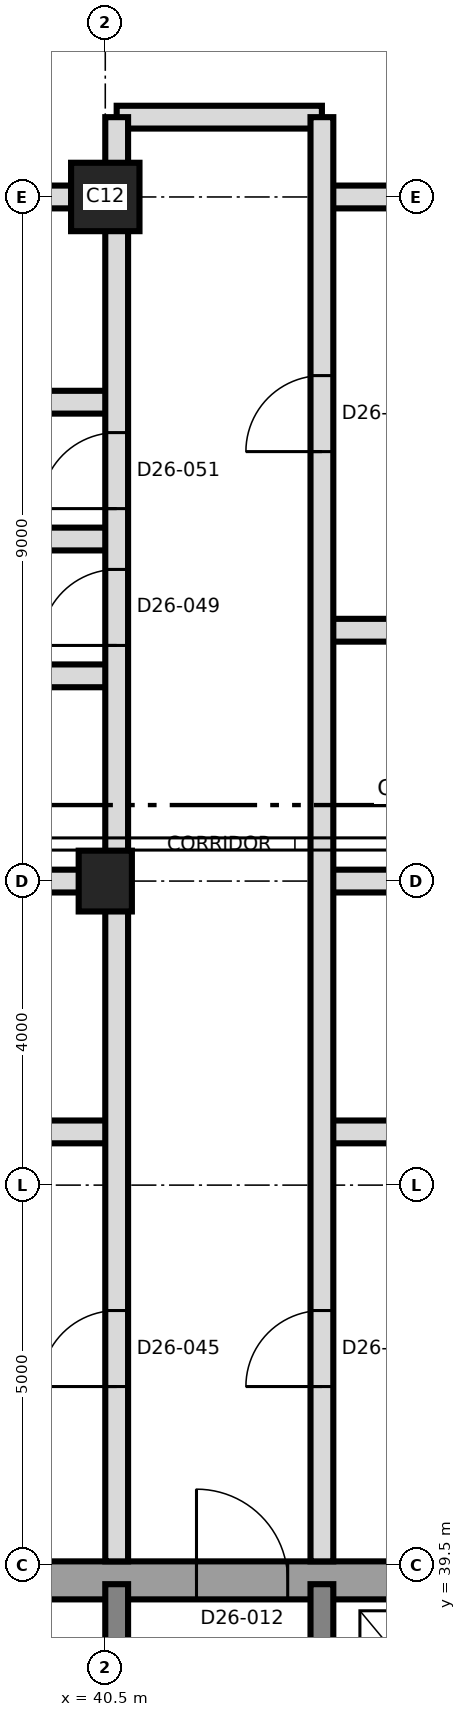
"""IFC4 building model, lengths in metres.
Left out: names, types, materials, properties, quantities, classifications, styles, units other than length and angle.
Written with IfcOpenShell. Run it as: python <this file> out.ifc"""

import sys

from ifc_helpers import new_model, si_unit, direction, frame, frame_2d, origin, origin_2d, place, context, subcontext, project, spatial, rectangle, extrude, element, fill, save


model = new_model("IFC4")
c1 = context("Model", 3, precision=1e-05, world=origin(), true_north=direction((0.0, 1.0)))
c2 = subcontext(c1, "Body", "Model", "MODEL_VIEW")
j1 = project(units=[si_unit("LENGTHUNIT", "METRE"), si_unit("PLANEANGLEUNIT", "RADIAN")], contexts=[c1])
p1 = place(None, origin())
s1 = spatial("IfcSite", under=j1, at=p1, CompositionType="ELEMENT")
p2 = place(p1, origin())
s2 = spatial("IfcBuilding", under=s1, at=p2, CompositionType="ELEMENT")
p3 = place(p2, frame((0.0, 0.0, 232.8)))
s3 = spatial("IfcBuildingStorey", under=s2, at=p3, CompositionType="ELEMENT", Elevation=232.8)
p4 = place(p3, frame((31.25, 39.3, 0.0), z_axis=(0.0, 0.0, 1.0), x_axis=(1.0, 0.0, 0.0)))
e1 = element("IfcWall", 1, at=p4, inside=s3, PredefinedType="SHEAR", context=c2, shape_type="SweptSolid", body=[
    extrude(rectangle(XDim=27.0, YDim=0.5, at=frame_2d((13.5, 0.0))), origin(), (0.0, 0.0, 1.0), 3.7),
])
p5 = place(p4, frame((10.45, 0.0, 0.0)))
e2 = element("IfcOpeningElement", 2, at=p5, cuts=e1, PredefinedType="OPENING", context=c2, shape_type="SweptSolid", body=[
    extrude(rectangle(XDim=1.2, YDim=2.1, at=frame_2d((0.6, 1.05))), frame((0.0, 0.26, 0.0), z_axis=(0.0, -1.0, 0.0), x_axis=(1.0, 0.0, 0.0)), (0.0, 0.0, 1.0), 0.52),
])
for number, where, z_axis, x_axis in (
    (3, (40.65, 33.5, 0.0), (0.0, 0.0, 1.0), (0.0, 1.0, 0.0)),
    (4, (43.35, 33.5, 0.0), (0.0, 0.0, 1.0), (0.0, 1.0, 0.0)),
):
    element("IfcWall", number, at=place(p3, frame(where, z_axis=z_axis, x_axis=x_axis)), inside=s3, PredefinedType="SHEAR", context=c2, shape_type="SweptSolid", body=[
        extrude(rectangle(XDim=5.75, YDim=0.3, at=frame_2d((2.875, 0.0))), origin(), (0.0, 0.0, 1.0), 3.7),
    ])
p6 = place(p3, frame((40.5, 48.5, 0.0), z_axis=(0.0, 0.0, 1.0), x_axis=(0.0, 1.0, 0.0)))
e5 = element("IfcColumn", 5, at=p6, inside=s3, PredefinedType="COLUMN", context=c2, shape_type="SweptSolid", body=[
    extrude(rectangle(XDim=0.8, YDim=0.7, at=origin_2d()), origin(), (0.0, 0.0, 1.0), 3.7),
])
p7 = place(p3, frame((40.5, 57.5, 0.0), z_axis=(0.0, 0.0, 1.0), x_axis=(1.0, 0.0, 0.0)))
e6 = element("IfcColumn", 6, at=p7, inside=s3, PredefinedType="COLUMN", context=c2, shape_type="SweptSolid", body=[
    extrude(rectangle(XDim=0.9, YDim=0.9, at=origin_2d()), origin(), (0.0, 0.0, 1.0), 3.7),
])
for number, where, z_axis, x_axis in (
    (7, (37.15, 45.2, 0.0), (0.0, 0.0, 1.0), (1.0, 0.0, 0.0)),
    (8, (43.35, 45.2, 0.0), (0.0, 0.0, 1.0), (1.0, 0.0, 0.0)),
):
    element("IfcWall", number, at=place(p3, frame(where, z_axis=z_axis, x_axis=x_axis)), inside=s3, PredefinedType="PARTITIONING", context=c2, shape_type="SweptSolid", body=[
        extrude(rectangle(XDim=3.5, YDim=0.3, at=frame_2d((1.75, 0.0))), origin(), (0.0, 0.0, 1.0), 3.4),
    ])
p8 = place(p3, frame((29.275, 48.5, 0.0), z_axis=(0.0, 0.0, 1.0), x_axis=(1.0, 0.0, 0.0)))
e9 = element("IfcWall", 9, at=p8, inside=s3, PredefinedType="PARTITIONING", context=c2, shape_type="SweptSolid", body=[
    extrude(rectangle(XDim=11.375, YDim=0.3, at=frame_2d((5.688, 0.0))), origin(), (0.0, 0.0, 1.0), 3.4),
])
p9 = place(p3, frame((43.35, 48.5, 0.0), z_axis=(0.0, 0.0, 1.0), x_axis=(1.0, 0.0, 0.0)))
e10 = element("IfcWall", 10, at=p9, inside=s3, PredefinedType="PARTITIONING", context=c2, shape_type="SweptSolid", body=[
    extrude(rectangle(XDim=8.555, YDim=0.3, at=frame_2d((4.277, 0.0))), origin(), (0.0, 0.0, 1.0), 3.4),
])
p10 = place(p3, frame((37.45, 51.2, 0.0), z_axis=(0.0, 0.0, 1.0), x_axis=(1.0, 0.0, 0.0)))
e11 = element("IfcWall", 11, at=p10, inside=s3, PredefinedType="PARTITIONING", context=c2, shape_type="SweptSolid", body=[
    extrude(rectangle(XDim=3.2, YDim=0.3, at=frame_2d((1.6, 0.0))), origin(), (0.0, 0.0, 1.0), 3.4),
])
p11 = place(p3, frame((43.35, 51.8, 0.0), z_axis=(0.0, 0.0, 1.0), x_axis=(1.0, 0.0, 0.0)))
e12 = element("IfcWall", 12, at=p11, inside=s3, PredefinedType="PARTITIONING", context=c2, shape_type="SweptSolid", body=[
    extrude(rectangle(XDim=3.5, YDim=0.3, at=frame_2d((1.75, 0.0))), origin(), (0.0, 0.0, 1.0), 3.4),
])
p12 = place(p3, frame((29.812, 53.0, 0.0), z_axis=(0.0, 0.0, 1.0), x_axis=(1.0, 0.0, 0.0)))
e13 = element("IfcWall", 13, at=p12, inside=s3, PredefinedType="PARTITIONING", context=c2, shape_type="SweptSolid", body=[
    extrude(rectangle(XDim=10.838, YDim=0.3, at=frame_2d((5.419, 0.0))), origin(), (0.0, 0.0, 1.0), 3.4),
])
p13 = place(p3, frame((37.45, 54.8, 0.0), z_axis=(0.0, 0.0, 1.0), x_axis=(1.0, 0.0, 0.0)))
e14 = element("IfcWall", 14, at=p13, inside=s3, PredefinedType="PARTITIONING", context=c2, shape_type="SweptSolid", body=[
    extrude(rectangle(XDim=3.2, YDim=0.3, at=frame_2d((1.6, 0.0))), origin(), (0.0, 0.0, 1.0), 3.4),
])
p14 = place(p3, frame((33.088, 57.5, 0.0), z_axis=(0.0, 0.0, 1.0), x_axis=(1.0, 0.0, 0.0)))
e15 = element("IfcWall", 15, at=p14, inside=s3, PredefinedType="PARTITIONING", context=c2, shape_type="SweptSolid", body=[
    extrude(rectangle(XDim=7.562, YDim=0.3, at=frame_2d((3.781, 0.0))), origin(), (0.0, 0.0, 1.0), 3.4),
])
p15 = place(p3, frame((43.35, 57.5, 0.0), z_axis=(0.0, 0.0, 1.0), x_axis=(1.0, 0.0, 0.0)))
e16 = element("IfcWall", 16, at=p15, inside=s3, PredefinedType="PARTITIONING", context=c2, shape_type="SweptSolid", body=[
    extrude(rectangle(XDim=4.562, YDim=0.3, at=frame_2d((2.281, 0.0))), origin(), (0.0, 0.0, 1.0), 3.4),
])
p16 = place(p3, frame((40.65, 58.55, 0.0), z_axis=(0.0, 0.0, 1.0), x_axis=(1.0, 0.0, 0.0)))
e17 = element("IfcWall", 17, at=p16, inside=s3, PredefinedType="PARTITIONING", context=c2, shape_type="SweptSolid", body=[
    extrude(rectangle(XDim=2.7, YDim=0.3, at=frame_2d((1.35, 0.0))), origin(), (0.0, 0.0, 1.0), 3.4),
])
p17 = place(p3, frame((40.65, 39.55, 0.0), z_axis=(0.0, 0.0, 1.0), x_axis=(0.0, 1.0, 0.0)))
e18 = element("IfcWall", 18, at=p17, inside=s3, PredefinedType="PARTITIONING", context=c2, shape_type="SweptSolid", body=[
    extrude(rectangle(XDim=19.0, YDim=0.3, at=frame_2d((9.5, 0.0))), origin(), (0.0, 0.0, 1.0), 3.4),
])
p18 = place(p17, frame((2.3, 0.0, 0.0)))
e19 = element("IfcOpeningElement", 19, at=p18, cuts=e18, PredefinedType="OPENING", context=c2, shape_type="SweptSolid", body=[
    extrude(rectangle(XDim=1.0, YDim=2.4, at=frame_2d((0.5, 1.2))), frame((0.0, 0.16, 0.0), z_axis=(0.0, -1.0, 0.0), x_axis=(1.0, 0.0, 0.0)), (0.0, 0.0, 1.0), 0.32),
])
p19 = place(p17, frame((12.05, 0.0, 0.0)))
e20 = element("IfcOpeningElement", 20, at=p19, cuts=e18, PredefinedType="OPENING", context=c2, shape_type="SweptSolid", body=[
    extrude(rectangle(XDim=1.0, YDim=2.1, at=frame_2d((0.5, 1.05))), frame((0.0, 0.16, 0.0), z_axis=(0.0, -1.0, 0.0), x_axis=(1.0, 0.0, 0.0)), (0.0, 0.0, 1.0), 0.32),
])
p20 = place(p17, frame((13.85, 0.0, 0.0)))
e21 = element("IfcOpeningElement", 21, at=p20, cuts=e18, PredefinedType="OPENING", context=c2, shape_type="SweptSolid", body=[
    extrude(rectangle(XDim=1.0, YDim=2.1, at=frame_2d((0.5, 1.05))), frame((0.0, 0.16, 0.0), z_axis=(0.0, -1.0, 0.0), x_axis=(1.0, 0.0, 0.0)), (0.0, 0.0, 1.0), 0.32),
])
p21 = place(p3, frame((43.35, 39.55, 0.0), z_axis=(0.0, 0.0, 1.0), x_axis=(0.0, 1.0, 0.0)))
e22 = element("IfcWall", 22, at=p21, inside=s3, PredefinedType="PARTITIONING", context=c2, shape_type="SweptSolid", body=[
    extrude(rectangle(XDim=19.0, YDim=0.3, at=frame_2d((9.5, 0.0))), origin(), (0.0, 0.0, 1.0), 3.4),
])
p22 = place(p21, frame((2.3, 0.0, 0.0)))
e23 = element("IfcOpeningElement", 23, at=p22, cuts=e22, PredefinedType="OPENING", context=c2, shape_type="SweptSolid", body=[
    extrude(rectangle(XDim=1.0, YDim=2.4, at=frame_2d((0.5, 1.2))), frame((0.0, 0.16, 0.0), z_axis=(0.0, -1.0, 0.0), x_axis=(1.0, 0.0, 0.0)), (0.0, 0.0, 1.0), 0.32),
])
p23 = place(p21, frame((14.6, 0.0, 0.0)))
e24 = element("IfcOpeningElement", 24, at=p23, cuts=e22, PredefinedType="OPENING", context=c2, shape_type="SweptSolid", body=[
    extrude(rectangle(XDim=1.0, YDim=2.4, at=frame_2d((0.5, 1.2))), frame((0.0, 0.16, 0.0), z_axis=(0.0, -1.0, 0.0), x_axis=(1.0, 0.0, 0.0)), (0.0, 0.0, 1.0), 0.32),
])
p24 = place(p5, origin())
e25 = element("IfcDoor", 25, at=p24, inside=s3, OperationType="SINGLE_SWING_RIGHT", PredefinedType="DOOR", context=c2, shape_type="SweptSolid", body=[
    extrude(rectangle(XDim=1.2, YDim=2.1, at=frame_2d((0.6, 1.05))), frame((0.0, 0.025, 0.0), z_axis=(0.0, -1.0, 0.0), x_axis=(1.0, 0.0, 0.0)), (0.0, 0.0, 1.0), 0.05),
])
fill(e2, e25)
p25 = place(p22, origin())
e26 = element("IfcDoor", 26, at=p25, inside=s3, OperationType="SINGLE_SWING_LEFT", PredefinedType="DOOR", context=c2, shape_type="SweptSolid", body=[
    extrude(rectangle(XDim=1.0, YDim=2.4, at=frame_2d((0.5, 1.2))), frame((0.0, 0.025, 0.0), z_axis=(0.0, -1.0, 0.0), x_axis=(1.0, 0.0, 0.0)), (0.0, 0.0, 1.0), 0.05),
])
fill(e23, e26)
p26 = place(p18, origin())
e27 = element("IfcDoor", 27, at=p26, inside=s3, OperationType="SINGLE_SWING_LEFT", PredefinedType="DOOR", context=c2, shape_type="SweptSolid", body=[
    extrude(rectangle(XDim=1.0, YDim=2.4, at=frame_2d((0.5, 1.2))), frame((0.0, 0.025, 0.0), z_axis=(0.0, -1.0, 0.0), x_axis=(1.0, 0.0, 0.0)), (0.0, 0.0, 1.0), 0.05),
])
fill(e19, e27)
p27 = place(p23, origin())
e28 = element("IfcDoor", 28, at=p27, inside=s3, OperationType="SINGLE_SWING_RIGHT", PredefinedType="DOOR", context=c2, shape_type="SweptSolid", body=[
    extrude(rectangle(XDim=1.0, YDim=2.4, at=frame_2d((0.5, 1.2))), frame((0.0, 0.025, 0.0), z_axis=(0.0, -1.0, 0.0), x_axis=(1.0, 0.0, 0.0)), (0.0, 0.0, 1.0), 0.05),
])
fill(e24, e28)
p28 = place(p19, origin())
e29 = element("IfcDoor", 29, at=p28, inside=s3, OperationType="SINGLE_SWING_LEFT", PredefinedType="DOOR", context=c2, shape_type="SweptSolid", body=[
    extrude(rectangle(XDim=1.0, YDim=2.1, at=frame_2d((0.5, 1.05))), frame((0.0, 0.025, 0.0), z_axis=(0.0, -1.0, 0.0), x_axis=(1.0, 0.0, 0.0)), (0.0, 0.0, 1.0), 0.05),
])
fill(e20, e29)
p29 = place(p20, origin())
e30 = element("IfcDoor", 30, at=p29, inside=s3, OperationType="SINGLE_SWING_LEFT", PredefinedType="DOOR", context=c2, shape_type="SweptSolid", body=[
    extrude(rectangle(XDim=1.0, YDim=2.1, at=frame_2d((0.5, 1.05))), frame((0.0, 0.025, 0.0), z_axis=(0.0, -1.0, 0.0), x_axis=(1.0, 0.0, 0.0)), (0.0, 0.0, 1.0), 0.05),
])
fill(e21, e30)
save(model, sys.argv[1])
